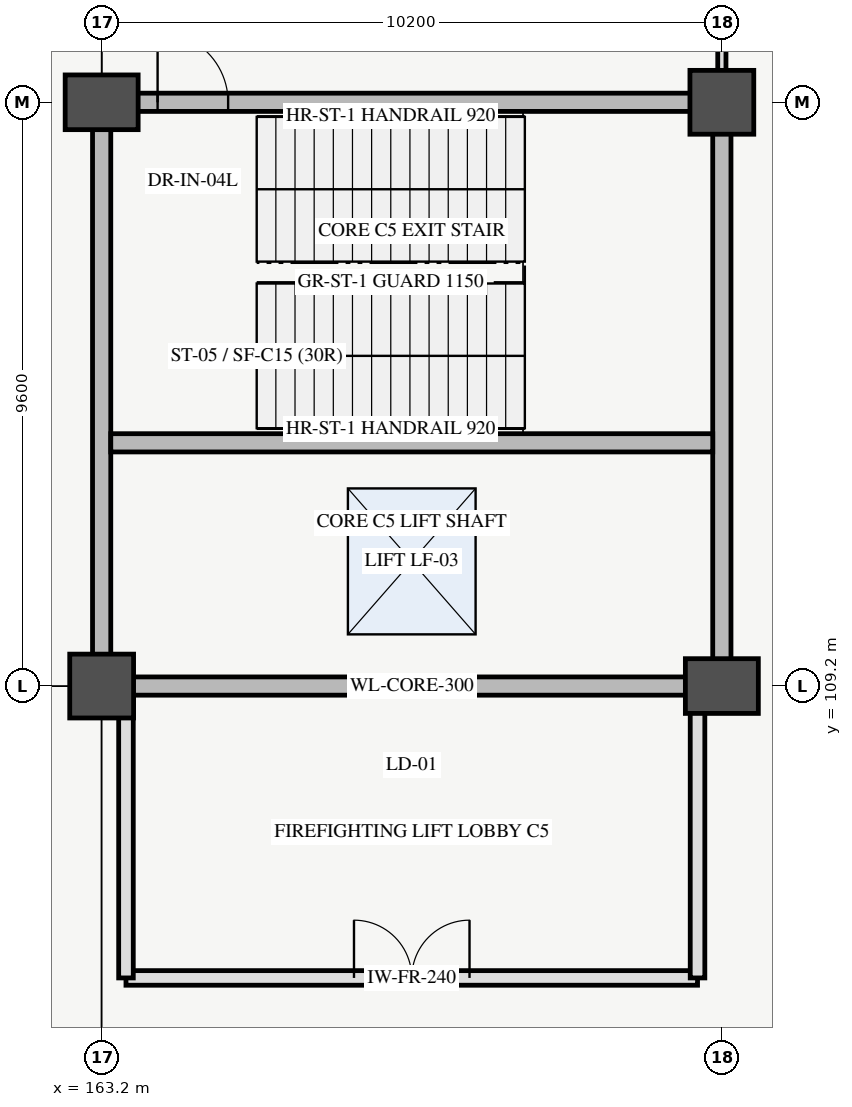
"""IFC4 building model, lengths in metres.
Left out: names, types, materials, properties, quantities, classifications, styles, units other than length and angle.
Written with IfcOpenShell. Run it as: python <this file> out.ifc"""

import sys

from ifc_helpers import new_model, si_unit, direction, frame, frame_2d, origin, origin_2d, place, context, subcontext, project, spatial, rectangle, extrude, element, fill, save


model = new_model("IFC4")
c1 = context("Model", 3, precision=1e-05, world=origin(), true_north=direction((0.0, 1.0)))
c2 = subcontext(c1, "Body", "Model", "MODEL_VIEW")
j1 = project(units=[si_unit("LENGTHUNIT", "METRE"), si_unit("PLANEANGLEUNIT", "RADIAN")], contexts=[c1])
p1 = place(None, origin())
s1 = spatial("IfcSite", under=j1, at=p1, CompositionType="ELEMENT")
p2 = place(p1, origin())
s2 = spatial("IfcBuilding", under=s1, at=p2, CompositionType="ELEMENT")
p3 = place(p2, frame((0.0, 0.0, -4.5)))
s3 = spatial("IfcBuildingStorey", under=s2, at=p3, CompositionType="ELEMENT", Elevation=-4.5)
p4 = place(p3, frame((163.2, 109.2, 0.0), z_axis=(0.0, 0.0, 1.0), x_axis=(1.0, 0.0, 0.0)))
e1 = element("IfcColumn", 1, at=p4, inside=s3, PredefinedType="COLUMN", context=c2, shape_type="SweptSolid", body=[
    extrude(rectangle(XDim=1.05, YDim=1.05, at=origin_2d()), origin(), (0.0, 0.0, 1.0), 4.5),
])
for number, where, z_axis, x_axis in (
    (2, (163.2, 118.8, 0.0), (0.0, 0.0, 1.0), (1.0, 0.0, 0.0)),
    (3, (173.4, 109.2, 0.0), (0.0, 0.0, 1.0), (1.0, 0.0, 0.0)),
):
    element("IfcColumn", number, at=place(p3, frame(where, z_axis=z_axis, x_axis=x_axis)), inside=s3, PredefinedType="COLUMN", context=c2, shape_type="SweptSolid", body=[
        extrude(rectangle(XDim=1.2, YDim=0.9, at=origin_2d()), origin(), (0.0, 0.0, 1.0), 4.5),
    ])
p5 = place(p3, frame((173.4, 118.8, 0.0), z_axis=(0.0, 0.0, 1.0), x_axis=(1.0, 0.0, 0.0)))
e4 = element("IfcColumn", 4, at=p5, inside=s3, PredefinedType="COLUMN", context=c2, shape_type="SweptSolid", body=[
    extrude(rectangle(XDim=1.05, YDim=1.05, at=origin_2d()), origin(), (0.0, 0.0, 1.0), 4.5),
])
p6 = place(p3, frame((163.2, 109.2, 0.0), z_axis=(0.0, 0.0, 1.0), x_axis=(1.0, 0.0, 0.0)))
e5 = element("IfcWall", 5, at=p6, inside=s3, PredefinedType="SHEAR", context=c2, shape_type="SweptSolid", body=[
    extrude(rectangle(XDim=10.2, YDim=0.3, at=frame_2d((5.1, 0.0))), origin(), (0.0, 0.0, 1.0), 4.5),
])
p7 = place(p6, frame((4.5, 0.0, 0.0)))
e6 = element("IfcOpeningElement", 6, at=p7, cuts=e5, PredefinedType="OPENING", context=c2, shape_type="SweptSolid", body=[
    extrude(rectangle(XDim=1.2, YDim=2.25, at=frame_2d((0.6, 1.125))), frame((0.0, 0.16, 0.0), z_axis=(0.0, -1.0, 0.0), x_axis=(1.0, 0.0, 0.0)), (0.0, 0.0, 1.0), 0.32),
])
p8 = place(p3, frame((163.2, 118.8, 0.0), z_axis=(0.0, 0.0, 1.0), x_axis=(1.0, 0.0, 0.0)))
e7 = element("IfcWall", 7, at=p8, inside=s3, PredefinedType="SHEAR", context=c2, shape_type="SweptSolid", body=[
    extrude(rectangle(XDim=10.2, YDim=0.3, at=frame_2d((5.1, 0.0))), origin(), (0.0, 0.0, 1.0), 4.5),
])
p9 = place(p8, frame((0.92, 0.0, 0.0)))
e8 = element("IfcOpeningElement", 8, at=p9, cuts=e7, PredefinedType="OPENING", context=c2, shape_type="SweptSolid", body=[
    extrude(rectangle(XDim=1.16, YDim=2.2, at=frame_2d((0.58, 1.1))), frame((0.0, 0.16, 0.0), z_axis=(0.0, -1.0, 0.0), x_axis=(1.0, 0.0, 0.0)), (0.0, 0.0, 1.0), 0.32),
])
for number, where, z_axis, x_axis in (
    (9, (163.2, 109.2, 0.0), (0.0, 0.0, 1.0), (0.0, 1.0, 0.0)),
    (10, (173.4, 109.2, 0.0), (0.0, 0.0, 1.0), (0.0, 1.0, 0.0)),
):
    element("IfcWall", number, at=place(p3, frame(where, z_axis=z_axis, x_axis=x_axis)), inside=s3, PredefinedType="SHEAR", context=c2, shape_type="SweptSolid", body=[
        extrude(rectangle(XDim=9.6, YDim=0.3, at=frame_2d((4.8, 0.0))), origin(), (0.0, 0.0, 1.0), 4.5),
    ])
p10 = place(p3, frame((163.35, 113.2, 0.0), z_axis=(0.0, 0.0, 1.0), x_axis=(1.0, 0.0, 0.0)))
e11 = element("IfcWall", 11, at=p10, inside=s3, PredefinedType="SHEAR", context=c2, shape_type="SweptSolid", body=[
    extrude(rectangle(XDim=9.9, YDim=0.3, at=frame_2d((4.95, 0.0))), origin(), (0.0, 0.0, 1.0), 4.5),
])
p11 = place(p3, frame((163.6, 104.4, 0.0), z_axis=(0.0, 0.0, 1.0), x_axis=(1.0, 0.0, 0.0)))
e12 = element("IfcWall", 12, at=p11, inside=s3, PredefinedType="PARTITIONING", context=c2, shape_type="SweptSolid", body=[
    extrude(rectangle(XDim=9.4, YDim=0.24, at=frame_2d((4.7, 0.0))), origin(), (0.0, 0.0, 1.0), 2.75),
])
p12 = place(p11, frame((3.75, 0.0, 0.0)))
e13 = element("IfcOpeningElement", 13, at=p12, cuts=e12, PredefinedType="OPENING", context=c2, shape_type="SweptSolid", body=[
    extrude(rectangle(XDim=1.9, YDim=2.25, at=frame_2d((0.95, 1.125))), frame((0.0, 0.13, 0.0), z_axis=(0.0, -1.0, 0.0), x_axis=(1.0, 0.0, 0.0)), (0.0, 0.0, 1.0), 0.26),
])
for number, where, z_axis, x_axis in (
    (14, (163.6, 104.4, 0.0), (0.0, 0.0, 1.0), (0.0, 1.0, 0.0)),
    (15, (173.0, 104.4, 0.0), (0.0, 0.0, 1.0), (0.0, 1.0, 0.0)),
):
    element("IfcWall", number, at=place(p3, frame(where, z_axis=z_axis, x_axis=x_axis)), inside=s3, PredefinedType="PARTITIONING", context=c2, shape_type="SweptSolid", body=[
        extrude(rectangle(XDim=4.6, YDim=0.24, at=frame_2d((2.3, 0.0))), origin(), (0.0, 0.0, 1.0), 2.75),
    ])
p13 = place(p3, frame((173.4, 119.2, 0.0), z_axis=(0.0, 0.0, 1.0), x_axis=(0.0, 1.0, 0.0)))
e16 = element("IfcWall", 16, at=p13, inside=s3, PredefinedType="PARTITIONING", context=c2, shape_type="SweptSolid", body=[
    extrude(rectangle(XDim=7.6, YDim=0.135, at=frame_2d((3.8, 0.0))), origin(), (0.0, 0.0, 1.0), 2.75),
])
p14 = place(p13, frame((3.36, 0.0, 0.0)))
e17 = element("IfcOpeningElement", 17, at=p14, cuts=e16, PredefinedType="OPENING", context=c2, shape_type="SweptSolid", body=[
    extrude(rectangle(XDim=0.88, YDim=2.08, at=frame_2d((0.44, 1.04))), frame((0.0, 0.077, 0.0), z_axis=(0.0, -1.0, 0.0), x_axis=(1.0, 0.0, 0.0)), (0.0, 0.0, 1.0), 0.155),
])
p15 = place(p9, origin())
e18 = element("IfcDoor", 18, at=p15, inside=s3, OperationType="SINGLE_SWING_LEFT", PredefinedType="DOOR", context=c2, shape_type="SweptSolid", body=[
    extrude(rectangle(XDim=1.16, YDim=2.2, at=frame_2d((0.58, 1.1))), frame((0.0, 0.025, 0.0), z_axis=(0.0, -1.0, 0.0), x_axis=(1.0, 0.0, 0.0)), (0.0, 0.0, 1.0), 0.05),
])
fill(e8, e18)
p16 = place(p7, origin())
e19 = element("IfcDoor", 19, at=p16, inside=s3, OperationType="SLIDING_TO_LEFT", PredefinedType="DOOR", context=c2, shape_type="SweptSolid", body=[
    extrude(rectangle(XDim=1.2, YDim=2.25, at=frame_2d((0.6, 1.125))), frame((0.0, 0.025, 0.0), z_axis=(0.0, -1.0, 0.0), x_axis=(1.0, 0.0, 0.0)), (0.0, 0.0, 1.0), 0.05),
])
fill(e6, e19)
p17 = place(p12, origin())
e20 = element("IfcDoor", 20, at=p17, inside=s3, OperationType="DOUBLE_DOOR_SINGLE_SWING", PredefinedType="DOOR", context=c2, shape_type="SweptSolid", body=[
    extrude(rectangle(XDim=1.9, YDim=2.25, at=frame_2d((0.95, 1.125))), frame((0.0, 0.025, 0.0), z_axis=(0.0, -1.0, 0.0), x_axis=(1.0, 0.0, 0.0)), (0.0, 0.0, 1.0), 0.05),
])
fill(e13, e20)
save(model, sys.argv[1])
